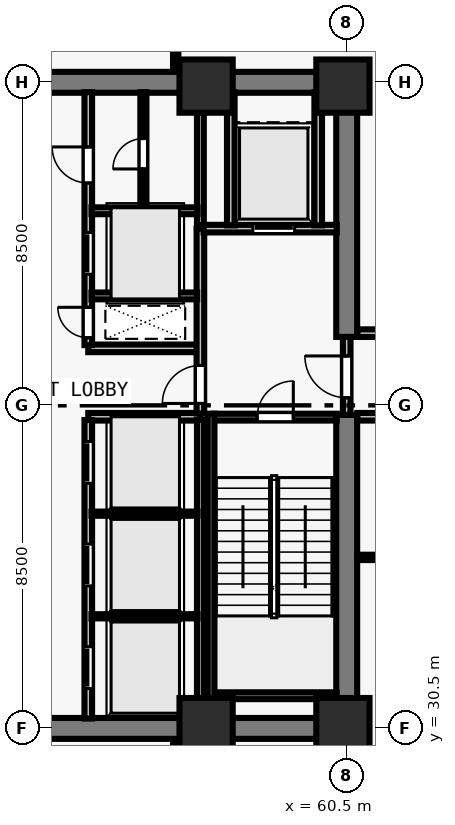
"""IFC4 building model, lengths in metres.
Left out: names, types, materials, properties, quantities, classifications, styles, units other than length and angle.
Written with IfcOpenShell. Run it as: python <this file> out.ifc"""

import sys

from ifc_helpers import new_model, si_unit, direction, frame, frame_2d, origin, origin_2d, place, context, subcontext, project, spatial, rectangle, extrude, element, fill, save


model = new_model("IFC4")
c1 = context("Model", 3, precision=1e-05, world=origin(), true_north=direction((0.0, 1.0)))
c2 = subcontext(c1, "Body", "Model", "MODEL_VIEW")
j1 = project(units=[si_unit("LENGTHUNIT", "METRE"), si_unit("PLANEANGLEUNIT", "RADIAN")], contexts=[c1])
p1 = place(None, origin())
s1 = spatial("IfcSite", under=j1, at=p1, CompositionType="ELEMENT")
p2 = place(p1, origin())
s2 = spatial("IfcBuilding", under=s1, at=p2, CompositionType="ELEMENT")
p3 = place(p2, origin())
s3 = spatial("IfcBuildingStorey", under=s2, at=p3, CompositionType="ELEMENT", Elevation=0.0)
for number, where, z_axis, x_axis in (
    (1, (56.8, 30.6, 0.0), (0.0, 0.0, 1.0), (1.0, 0.0, 0.0)),
    (2, (60.4, 30.6, 0.0), (0.0, 0.0, 1.0), (1.0, 0.0, 0.0)),
    (3, (56.8, 47.4, 0.0), (0.0, 0.0, 1.0), (1.0, 0.0, 0.0)),
    (4, (60.4, 47.4, 0.0), (0.0, 0.0, 1.0), (1.0, 0.0, 0.0)),
):
    element("IfcColumn", number, at=place(p3, frame(where, z_axis=z_axis, x_axis=x_axis)), inside=s3, PredefinedType="COLUMN", context=c2, shape_type="SweptSolid", body=[
        extrude(rectangle(XDim=1.4, YDim=1.4, at=origin_2d()), origin(), (0.0, 0.0, 1.0), 5.0),
    ])
for number, where, z_axis, x_axis in (
    (5, (43.225, 30.5, 0.0), (0.0, 0.0, 1.0), (1.0, 0.0, 0.0)),
    (6, (43.225, 47.5, 0.0), (0.0, 0.0, 1.0), (1.0, 0.0, 0.0)),
):
    element("IfcWall", number, at=place(p3, frame(where, z_axis=z_axis, x_axis=x_axis)), inside=s3, PredefinedType="SHEAR", context=c2, shape_type="SweptSolid", body=[
        extrude(rectangle(XDim=17.55, YDim=0.55, at=frame_2d((8.775, 0.0))), origin(), (0.0, 0.0, 1.0), 4.7),
    ])
p4 = place(p3, frame((60.5, 30.765, 0.0), z_axis=(0.0, 0.0, 1.0), x_axis=(0.0, 1.0, 0.0)))
e7 = element("IfcWall", 7, at=p4, inside=s3, PredefinedType="SHEAR", context=c2, shape_type="SweptSolid", body=[
    extrude(rectangle(XDim=7.985, YDim=0.55, at=frame_2d((3.993, 0.0))), origin(), (0.0, 0.0, 1.0), 4.7),
])
p5 = place(p3, frame((60.5, 40.8, 0.0), z_axis=(0.0, 0.0, 1.0), x_axis=(0.0, 1.0, 0.0)))
e8 = element("IfcWall", 8, at=p5, inside=s3, PredefinedType="SHEAR", context=c2, shape_type="SweptSolid", body=[
    extrude(rectangle(XDim=6.435, YDim=0.55, at=frame_2d((3.218, 0.0))), origin(), (0.0, 0.0, 1.0), 4.7),
])
for number, where, z_axis, x_axis in (
    (9, (53.7, 38.7, 0.0), (0.0, 0.0, 1.0), (1.0, 0.0, 0.0)),
    (10, (53.7, 40.5, 0.0), (0.0, 0.0, 1.0), (1.0, 0.0, 0.0)),
):
    element("IfcWall", number, at=place(p3, frame(where, z_axis=z_axis, x_axis=x_axis)), inside=s3, PredefinedType="SOLIDWALL", context=c2, shape_type="SweptSolid", body=[
        extrude(rectangle(XDim=2.95, YDim=0.2, at=frame_2d((1.475, 0.0))), origin(), (0.0, 0.0, 1.0), 4.7),
    ])
p6 = place(p3, frame((53.7, 30.76, 0.0), z_axis=(0.0, 0.0, 1.0), x_axis=(0.0, 1.0, 0.0)))
e11 = element("IfcWall", 11, at=p6, inside=s3, PredefinedType="SOLIDWALL", context=c2, shape_type="SweptSolid", body=[
    extrude(rectangle(XDim=7.855, YDim=0.2, at=frame_2d((3.927, 0.0))), origin(), (0.0, 0.0, 1.0), 4.7),
])
p7 = place(p6, frame((0.79, 0.0, 0.0)))
e12 = element("IfcOpeningElement", 12, at=p7, cuts=e11, PredefinedType="OPENING", context=c2, shape_type="SweptSolid", body=[
    extrude(rectangle(XDim=1.1, YDim=2.2, at=frame_2d((0.55, 1.1))), frame((0.0, 0.11, 0.0), z_axis=(0.0, -1.0, 0.0), x_axis=(1.0, 0.0, 0.0)), (0.0, 0.0, 1.0), 0.22),
])
p8 = place(p6, frame((3.49, 0.0, 0.0)))
e13 = element("IfcOpeningElement", 13, at=p8, cuts=e11, PredefinedType="OPENING", context=c2, shape_type="SweptSolid", body=[
    extrude(rectangle(XDim=1.1, YDim=2.2, at=frame_2d((0.55, 1.1))), frame((0.0, 0.11, 0.0), z_axis=(0.0, -1.0, 0.0), x_axis=(1.0, 0.0, 0.0)), (0.0, 0.0, 1.0), 0.22),
])
p9 = place(p6, frame((6.19, 0.0, 0.0)))
e14 = element("IfcOpeningElement", 14, at=p9, cuts=e11, PredefinedType="OPENING", context=c2, shape_type="SweptSolid", body=[
    extrude(rectangle(XDim=1.1, YDim=2.2, at=frame_2d((0.55, 1.1))), frame((0.0, 0.11, 0.0), z_axis=(0.0, -1.0, 0.0), x_axis=(1.0, 0.0, 0.0)), (0.0, 0.0, 1.0), 0.22),
])
p10 = place(p3, frame((53.7, 40.585, 0.0), z_axis=(0.0, 0.0, 1.0), x_axis=(0.0, 1.0, 0.0)))
e15 = element("IfcWall", 15, at=p10, inside=s3, PredefinedType="SOLIDWALL", context=c2, shape_type="SweptSolid", body=[
    extrude(rectangle(XDim=6.655, YDim=0.2, at=frame_2d((3.328, 0.0))), origin(), (0.0, 0.0, 1.0), 4.7),
])
p11 = place(p10, frame((0.195, 0.0, 0.0)))
e16 = element("IfcOpeningElement", 16, at=p11, cuts=e15, PredefinedType="OPENING", context=c2, shape_type="SweptSolid", body=[
    extrude(rectangle(XDim=0.8, YDim=2.08, at=frame_2d((0.4, 1.04))), frame((0.0, 0.11, 0.0), z_axis=(0.0, -1.0, 0.0), x_axis=(1.0, 0.0, 0.0)), (0.0, 0.0, 1.0), 0.22),
])
p12 = place(p10, frame((1.865, 0.0, 0.0)))
e17 = element("IfcOpeningElement", 17, at=p12, cuts=e15, PredefinedType="OPENING", context=c2, shape_type="SweptSolid", body=[
    extrude(rectangle(XDim=1.1, YDim=2.2, at=frame_2d((0.55, 1.1))), frame((0.0, 0.11, 0.0), z_axis=(0.0, -1.0, 0.0), x_axis=(1.0, 0.0, 0.0)), (0.0, 0.0, 1.0), 0.22),
])
p13 = place(p10, frame((4.265, 0.0, 0.0)))
e18 = element("IfcOpeningElement", 18, at=p13, cuts=e15, PredefinedType="OPENING", context=c2, shape_type="SweptSolid", body=[
    extrude(rectangle(XDim=0.95, YDim=2.12, at=frame_2d((0.475, 1.06))), frame((0.0, 0.11, 0.0), z_axis=(0.0, -1.0, 0.0), x_axis=(1.0, 0.0, 0.0)), (0.0, 0.0, 1.0), 0.22),
])
p14 = place(p3, frame((60.5, 38.75, 0.0), z_axis=(0.0, 0.0, 1.0), x_axis=(0.0, 1.0, 0.0)))
e19 = element("IfcWall", 19, at=p14, inside=s3, PredefinedType="SOLIDWALL", context=c2, shape_type="SweptSolid", body=[
    extrude(rectangle(XDim=2.05, YDim=0.2, at=frame_2d((1.025, 0.0))), origin(), (0.0, 0.0, 1.0), 4.7),
])
p15 = place(p14, frame((0.45, 0.0, 0.0)))
e20 = element("IfcOpeningElement", 20, at=p15, cuts=e19, PredefinedType="OPENING", context=c2, shape_type="SweptSolid", body=[
    extrude(rectangle(XDim=1.1, YDim=2.15, at=frame_2d((0.55, 1.075))), frame((0.0, 0.11, 0.0), z_axis=(0.0, -1.0, 0.0), x_axis=(1.0, 0.0, 0.0)), (0.0, 0.0, 1.0), 0.22),
])
p16 = place(p3, frame((56.65, 38.785, 0.0), z_axis=(0.0, 0.0, 1.0), x_axis=(0.0, 1.0, 0.0)))
e21 = element("IfcWall", 21, at=p16, inside=s3, PredefinedType="SOLIDWALL", context=c2, shape_type="SweptSolid", body=[
    extrude(rectangle(XDim=4.865, YDim=0.2, at=frame_2d((2.433, 0.0))), origin(), (0.0, 0.0, 1.0), 4.7),
])
p17 = place(p16, frame((0.265, 0.0, 0.0)))
e22 = element("IfcOpeningElement", 22, at=p17, cuts=e21, PredefinedType="OPENING", context=c2, shape_type="SweptSolid", body=[
    extrude(rectangle(XDim=1.0, YDim=2.15, at=frame_2d((0.5, 1.075))), frame((0.0, 0.11, 0.0), z_axis=(0.0, -1.0, 0.0), x_axis=(1.0, 0.0, 0.0)), (0.0, 0.0, 1.0), 0.22),
])
p18 = place(p3, frame((56.735, 43.65, 0.0), z_axis=(0.0, 0.0, 1.0), x_axis=(1.0, 0.0, 0.0)))
e23 = element("IfcWall", 23, at=p18, inside=s3, PredefinedType="SOLIDWALL", context=c2, shape_type="SweptSolid", body=[
    extrude(rectangle(XDim=3.505, YDim=0.2, at=frame_2d((1.752, 0.0))), origin(), (0.0, 0.0, 1.0), 4.7),
])
p19 = place(p18, frame((1.295, 0.0, 0.0)))
e24 = element("IfcOpeningElement", 24, at=p19, cuts=e23, PredefinedType="OPENING", context=c2, shape_type="SweptSolid", body=[
    extrude(rectangle(XDim=1.1, YDim=2.2, at=frame_2d((0.55, 1.1))), frame((0.0, 0.11, 0.0), z_axis=(0.0, -1.0, 0.0), x_axis=(1.0, 0.0, 0.0)), (0.0, 0.0, 1.0), 0.22),
])
for number, where, z_axis, x_axis in (
    (25, (57.45, 43.735, 0.0), (0.0, 0.0, 1.0), (0.0, 1.0, 0.0)),
    (26, (59.75, 43.735, 0.0), (0.0, 0.0, 1.0), (0.0, 1.0, 0.0)),
):
    element("IfcWall", number, at=place(p3, frame(where, z_axis=z_axis, x_axis=x_axis)), inside=s3, PredefinedType="SOLIDWALL", context=c2, shape_type="SweptSolid", body=[
        extrude(rectangle(XDim=3.505, YDim=0.2, at=frame_2d((1.752, 0.0))), origin(), (0.0, 0.0, 1.0), 4.7),
    ])
p20 = place(p3, frame((56.65, 30.76, 0.0), z_axis=(0.0, 0.0, 1.0), x_axis=(0.0, 1.0, 0.0)))
e27 = element("IfcWall", 27, at=p20, inside=s3, PredefinedType="SOLIDWALL", context=c2, shape_type="SweptSolid", body=[
    extrude(rectangle(XDim=7.855, YDim=0.18, at=frame_2d((3.927, 0.0))), origin(), (0.0, 0.0, 1.0), 4.7),
])
for number, where, z_axis, x_axis in (
    (28, (53.785, 33.45, 0.0), (0.0, 0.0, 1.0), (1.0, 0.0, 0.0)),
    (29, (53.785, 36.15, 0.0), (0.0, 0.0, 1.0), (1.0, 0.0, 0.0)),
):
    element("IfcWall", number, at=place(p3, frame(where, z_axis=z_axis, x_axis=x_axis)), inside=s3, PredefinedType="PARTITIONING", context=c2, shape_type="SweptSolid", body=[
        extrude(rectangle(XDim=2.79, YDim=0.11, at=frame_2d((1.395, 0.0))), origin(), (0.0, 0.0, 1.0), 4.7),
    ])
p21 = place(p3, frame((56.65, 43.735, 0.0), z_axis=(0.0, 0.0, 1.0), x_axis=(0.0, 1.0, 0.0)))
e30 = element("IfcWall", 30, at=p21, inside=s3, PredefinedType="SOLIDWALL", context=c2, shape_type="SweptSolid", body=[
    extrude(rectangle(XDim=3.505, YDim=0.18, at=frame_2d((1.752, 0.0))), origin(), (0.0, 0.0, 1.0), 4.7),
])
p22 = place(p3, frame((53.785, 41.88, 0.0), z_axis=(0.0, 0.0, 1.0), x_axis=(1.0, 0.0, 0.0)))
e31 = element("IfcWall", 31, at=p22, inside=s3, PredefinedType="SOLIDWALL", context=c2, shape_type="SweptSolid", body=[
    extrude(rectangle(XDim=2.78, YDim=0.18, at=frame_2d((1.39, 0.0))), origin(), (0.0, 0.0, 1.0), 4.7),
])
p23 = place(p3, frame((53.785, 44.12, 0.0), z_axis=(0.0, 0.0, 1.0), x_axis=(1.0, 0.0, 0.0)))
e32 = element("IfcWall", 32, at=p23, inside=s3, PredefinedType="SOLIDWALL", context=c2, shape_type="SweptSolid", body=[
    extrude(rectangle(XDim=2.79, YDim=0.18, at=frame_2d((1.395, 0.0))), origin(), (0.0, 0.0, 1.0), 4.7),
])
p24 = place(p3, frame((55.15, 44.195, 0.0), z_axis=(0.0, 0.0, 1.0), x_axis=(0.0, 1.0, 0.0)))
e33 = element("IfcWall", 33, at=p24, inside=s3, PredefinedType="PARTITIONING", context=c2, shape_type="SweptSolid", body=[
    extrude(rectangle(XDim=3.045, YDim=0.16, at=frame_2d((1.522, 0.0))), origin(), (0.0, 0.0, 1.0), 4.7),
])
p25 = place(p24, frame((1.025, 0.0, 0.0)))
e34 = element("IfcOpeningElement", 34, at=p25, cuts=e33, PredefinedType="OPENING", context=c2, shape_type="SweptSolid", body=[
    extrude(rectangle(XDim=0.8, YDim=2.1, at=frame_2d((0.4, 1.05))), frame((0.0, 0.09, 0.0), z_axis=(0.0, -1.0, 0.0), x_axis=(1.0, 0.0, 0.0)), (0.0, 0.0, 1.0), 0.18),
])
p26 = place(p3, frame((56.0, 47.78, 0.0), z_axis=(0.0, 0.0, 1.0), x_axis=(0.0, 1.0, 0.0)))
e35 = element("IfcWall", 35, at=p26, inside=s3, PredefinedType="PARTITIONING", context=c2, shape_type="SweptSolid", body=[
    extrude(rectangle(XDim=17.8, YDim=0.14, at=frame_2d((8.9, 0.0))), origin(), (0.0, 0.0, 1.0), 4.7),
])
p27 = place(p26, frame((6.0, 0.0, 0.0)))
e36 = element("IfcOpeningElement", 36, at=p27, cuts=e35, PredefinedType="OPENING", context=c2, shape_type="SweptSolid", body=[
    extrude(rectangle(XDim=1.4, YDim=2.2, at=frame_2d((0.7, 1.1))), frame((0.0, 0.08, 0.0), z_axis=(0.0, -1.0, 0.0), x_axis=(1.0, 0.0, 0.0)), (0.0, 0.0, 1.0), 0.16),
])
p28 = place(p3, frame((56.0, 12.42, 0.0), z_axis=(0.0, 0.0, 1.0), x_axis=(0.0, 1.0, 0.0)))
e37 = element("IfcWall", 37, at=p28, inside=s3, PredefinedType="PARTITIONING", context=c2, shape_type="SweptSolid", body=[
    extrude(rectangle(XDim=17.8, YDim=0.14, at=frame_2d((8.9, 0.0))), origin(), (0.0, 0.0, 1.0), 4.7),
])
p29 = place(p28, frame((6.5, 0.0, 0.0)))
e38 = element("IfcOpeningElement", 38, at=p29, cuts=e37, PredefinedType="OPENING", context=c2, shape_type="SweptSolid", body=[
    extrude(rectangle(XDim=1.4, YDim=2.2, at=frame_2d((0.7, 1.1))), frame((0.0, 0.08, 0.0), z_axis=(0.0, -1.0, 0.0), x_axis=(1.0, 0.0, 0.0)), (0.0, 0.0, 1.0), 0.16),
])
p30 = place(p3, frame((85.58, 38.7, 0.0), z_axis=(0.0, 0.0, 1.0), x_axis=(-1.0, 0.0, 0.0)))
e39 = element("IfcWall", 39, at=p30, inside=s3, PredefinedType="SOLIDWALL", context=c2, shape_type="SweptSolid", body=[
    extrude(rectangle(XDim=24.8, YDim=0.2, at=frame_2d((12.4, 0.0))), origin(), (0.0, 0.0, 1.0), 4.7),
])
p31 = place(p30, frame((20.5, 0.0, 0.0)))
e40 = element("IfcOpeningElement", 40, at=p31, cuts=e39, PredefinedType="OPENING", context=c2, shape_type="SweptSolid", body=[
    extrude(rectangle(XDim=1.1, YDim=2.15, at=frame_2d((0.55, 1.075))), frame((0.0, 0.11, 0.0), z_axis=(0.0, -1.0, 0.0), x_axis=(1.0, 0.0, 0.0)), (0.0, 0.0, 1.0), 0.22),
])
p32 = place(p3, frame((60.78, 40.9, 0.0), z_axis=(0.0, 0.0, 1.0), x_axis=(1.0, 0.0, 0.0)))
e41 = element("IfcWall", 41, at=p32, inside=s3, PredefinedType="SOLIDWALL", context=c2, shape_type="SweptSolid", body=[
    extrude(rectangle(XDim=24.8, YDim=0.2, at=frame_2d((12.4, 0.0))), origin(), (0.0, 0.0, 1.0), 4.7),
])
p33 = place(p32, frame((8.5, 0.0, 0.0)))
e42 = element("IfcOpeningElement", 42, at=p33, cuts=e41, PredefinedType="OPENING", context=c2, shape_type="SweptSolid", body=[
    extrude(rectangle(XDim=1.1, YDim=2.15, at=frame_2d((0.55, 1.075))), frame((0.0, 0.11, 0.0), z_axis=(0.0, -1.0, 0.0), x_axis=(1.0, 0.0, 0.0)), (0.0, 0.0, 1.0), 0.22),
])
p34 = place(p3, frame((60.78, 35.0, 0.0), z_axis=(0.0, 0.0, 1.0), x_axis=(1.0, 0.0, 0.0)))
e43 = element("IfcWall", 43, at=p34, inside=s3, PredefinedType="PARTITIONING", context=c2, shape_type="SweptSolid", body=[
    extrude(rectangle(XDim=24.8, YDim=0.14, at=frame_2d((12.4, 0.0))), origin(), (0.0, 0.0, 1.0), 4.7),
])
p35 = place(p34, frame((5.5, 0.0, 0.0)))
e44 = element("IfcOpeningElement", 44, at=p35, cuts=e43, PredefinedType="OPENING", context=c2, shape_type="SweptSolid", body=[
    extrude(rectangle(XDim=1.4, YDim=2.2, at=frame_2d((0.7, 1.1))), frame((0.0, 0.08, 0.0), z_axis=(0.0, -1.0, 0.0), x_axis=(1.0, 0.0, 0.0)), (0.0, 0.0, 1.0), 0.16),
])
p36 = place(p34, frame((13.5, 0.0, 0.0)))
e45 = element("IfcOpeningElement", 45, at=p36, cuts=e43, PredefinedType="OPENING", context=c2, shape_type="SweptSolid", body=[
    extrude(rectangle(XDim=1.76, YDim=2.2, at=frame_2d((0.88, 1.1))), frame((0.0, 0.08, 0.0), z_axis=(0.0, -1.0, 0.0), x_axis=(1.0, 0.0, 0.0)), (0.0, 0.0, 1.0), 0.16),
])
p37 = place(p3, frame((57.005, 38.69, 0.0), z_axis=(0.0, 0.0, 1.0), x_axis=(1.0, 0.0, 0.0)))
e46 = element("IfcWall", 46, at=p37, inside=s3, PredefinedType="SOLIDWALL", context=c2, shape_type="SweptSolid", body=[
    extrude(rectangle(XDim=3.23, YDim=0.18, at=frame_2d((1.615, 0.0))), origin(), (0.0, 0.0, 1.0), 4.7),
])
p38 = place(p37, frame((1.14, 0.0, 0.0)))
e47 = element("IfcOpeningElement", 47, at=p38, cuts=e46, PredefinedType="OPENING", context=c2, shape_type="SweptSolid", body=[
    extrude(rectangle(XDim=0.95, YDim=2.15, at=frame_2d((0.475, 1.075))), frame((0.0, 0.1, 0.0), z_axis=(0.0, -1.0, 0.0), x_axis=(1.0, 0.0, 0.0)), (0.0, 0.0, 1.0), 0.2),
])
p39 = place(p3, frame((57.005, 31.36, 0.0), z_axis=(0.0, 0.0, 1.0), x_axis=(1.0, 0.0, 0.0)))
e48 = element("IfcWall", 48, at=p39, inside=s3, PredefinedType="SOLIDWALL", context=c2, shape_type="SweptSolid", body=[
    extrude(rectangle(XDim=3.23, YDim=0.18, at=frame_2d((1.615, 0.0))), origin(), (0.0, 0.0, 1.0), 4.7),
])
p40 = place(p3, frame((56.93, 38.78, 0.0), z_axis=(0.0, 0.0, 1.0), x_axis=(0.0, -1.0, 0.0)))
e49 = element("IfcWall", 49, at=p40, inside=s3, PredefinedType="SOLIDWALL", context=c2, shape_type="SweptSolid", body=[
    extrude(rectangle(XDim=8.017, YDim=0.18, at=frame_2d((4.009, 0.0))), origin(), (0.0, 0.0, 1.0), 4.7),
])
p41 = place(p15, origin())
e50 = element("IfcDoor", 50, at=p41, inside=s3, OperationType="SINGLE_SWING_RIGHT", PredefinedType="DOOR", context=c2, shape_type="SweptSolid", body=[
    extrude(rectangle(XDim=1.1, YDim=2.15, at=frame_2d((0.55, 1.075))), frame((0.0, 0.025, 0.0), z_axis=(0.0, -1.0, 0.0), x_axis=(1.0, 0.0, 0.0)), (0.0, 0.0, 1.0), 0.05),
])
fill(e20, e50)
p42 = place(p17, origin())
e51 = element("IfcDoor", 51, at=p42, inside=s3, OperationType="SINGLE_SWING_LEFT", PredefinedType="DOOR", context=c2, shape_type="SweptSolid", body=[
    extrude(rectangle(XDim=1.0, YDim=2.15, at=frame_2d((0.5, 1.075))), frame((0.0, 0.025, 0.0), z_axis=(0.0, -1.0, 0.0), x_axis=(1.0, 0.0, 0.0)), (0.0, 0.0, 1.0), 0.05),
])
fill(e22, e51)
p43 = place(p19, origin())
e52 = element("IfcDoor", 52, at=p43, inside=s3, OperationType="SLIDING_TO_LEFT", PredefinedType="DOOR", context=c2, shape_type="SweptSolid", body=[
    extrude(rectangle(XDim=1.1, YDim=2.2, at=frame_2d((0.55, 1.1))), frame((0.0, 0.025, 0.0), z_axis=(0.0, -1.0, 0.0), x_axis=(1.0, 0.0, 0.0)), (0.0, 0.0, 1.0), 0.05),
])
fill(e24, e52)
p44 = place(p7, origin())
e53 = element("IfcDoor", 53, at=p44, inside=s3, OperationType="SLIDING_TO_LEFT", PredefinedType="DOOR", context=c2, shape_type="SweptSolid", body=[
    extrude(rectangle(XDim=1.1, YDim=2.2, at=frame_2d((0.55, 1.1))), frame((0.0, 0.025, 0.0), z_axis=(0.0, -1.0, 0.0), x_axis=(1.0, 0.0, 0.0)), (0.0, 0.0, 1.0), 0.05),
])
fill(e12, e53)
p45 = place(p8, origin())
e54 = element("IfcDoor", 54, at=p45, inside=s3, OperationType="SLIDING_TO_LEFT", PredefinedType="DOOR", context=c2, shape_type="SweptSolid", body=[
    extrude(rectangle(XDim=1.1, YDim=2.2, at=frame_2d((0.55, 1.1))), frame((0.0, 0.025, 0.0), z_axis=(0.0, -1.0, 0.0), x_axis=(1.0, 0.0, 0.0)), (0.0, 0.0, 1.0), 0.05),
])
fill(e13, e54)
p46 = place(p9, origin())
e55 = element("IfcDoor", 55, at=p46, inside=s3, OperationType="SLIDING_TO_LEFT", PredefinedType="DOOR", context=c2, shape_type="SweptSolid", body=[
    extrude(rectangle(XDim=1.1, YDim=2.2, at=frame_2d((0.55, 1.1))), frame((0.0, 0.025, 0.0), z_axis=(0.0, -1.0, 0.0), x_axis=(1.0, 0.0, 0.0)), (0.0, 0.0, 1.0), 0.05),
])
fill(e14, e55)
p47 = place(p11, origin())
e56 = element("IfcDoor", 56, at=p47, inside=s3, OperationType="SINGLE_SWING_RIGHT", PredefinedType="DOOR", context=c2, shape_type="SweptSolid", body=[
    extrude(rectangle(XDim=0.8, YDim=2.08, at=frame_2d((0.4, 1.04))), frame((0.0, 0.025, 0.0), z_axis=(0.0, -1.0, 0.0), x_axis=(1.0, 0.0, 0.0)), (0.0, 0.0, 1.0), 0.05),
])
fill(e16, e56)
p48 = place(p12, origin())
e57 = element("IfcDoor", 57, at=p48, inside=s3, OperationType="SLIDING_TO_LEFT", PredefinedType="DOOR", context=c2, shape_type="SweptSolid", body=[
    extrude(rectangle(XDim=1.1, YDim=2.2, at=frame_2d((0.55, 1.1))), frame((0.0, 0.025, 0.0), z_axis=(0.0, -1.0, 0.0), x_axis=(1.0, 0.0, 0.0)), (0.0, 0.0, 1.0), 0.05),
])
fill(e17, e57)
p49 = place(p13, origin())
e58 = element("IfcDoor", 58, at=p49, inside=s3, OperationType="SINGLE_SWING_RIGHT", PredefinedType="DOOR", context=c2, shape_type="SweptSolid", body=[
    extrude(rectangle(XDim=0.95, YDim=2.12, at=frame_2d((0.475, 1.06))), frame((0.0, 0.025, 0.0), z_axis=(0.0, -1.0, 0.0), x_axis=(1.0, 0.0, 0.0)), (0.0, 0.0, 1.0), 0.05),
])
fill(e18, e58)
p50 = place(p25, origin())
e59 = element("IfcDoor", 59, at=p50, inside=s3, OperationType="SINGLE_SWING_LEFT", PredefinedType="DOOR", context=c2, shape_type="SweptSolid", body=[
    extrude(rectangle(XDim=0.8, YDim=2.1, at=frame_2d((0.4, 1.05))), frame((0.0, 0.025, 0.0), z_axis=(0.0, -1.0, 0.0), x_axis=(1.0, 0.0, 0.0)), (0.0, 0.0, 1.0), 0.05),
])
fill(e34, e59)
p51 = place(p38, origin())
e60 = element("IfcDoor", 60, at=p51, inside=s3, OperationType="SINGLE_SWING_RIGHT", PredefinedType="DOOR", context=c2, shape_type="SweptSolid", body=[
    extrude(rectangle(XDim=0.95, YDim=2.15, at=frame_2d((0.475, 1.075))), frame((0.0, 0.025, 0.0), z_axis=(0.0, -1.0, 0.0), x_axis=(1.0, 0.0, 0.0)), (0.0, 0.0, 1.0), 0.05),
])
fill(e47, e60)
save(model, sys.argv[1])
